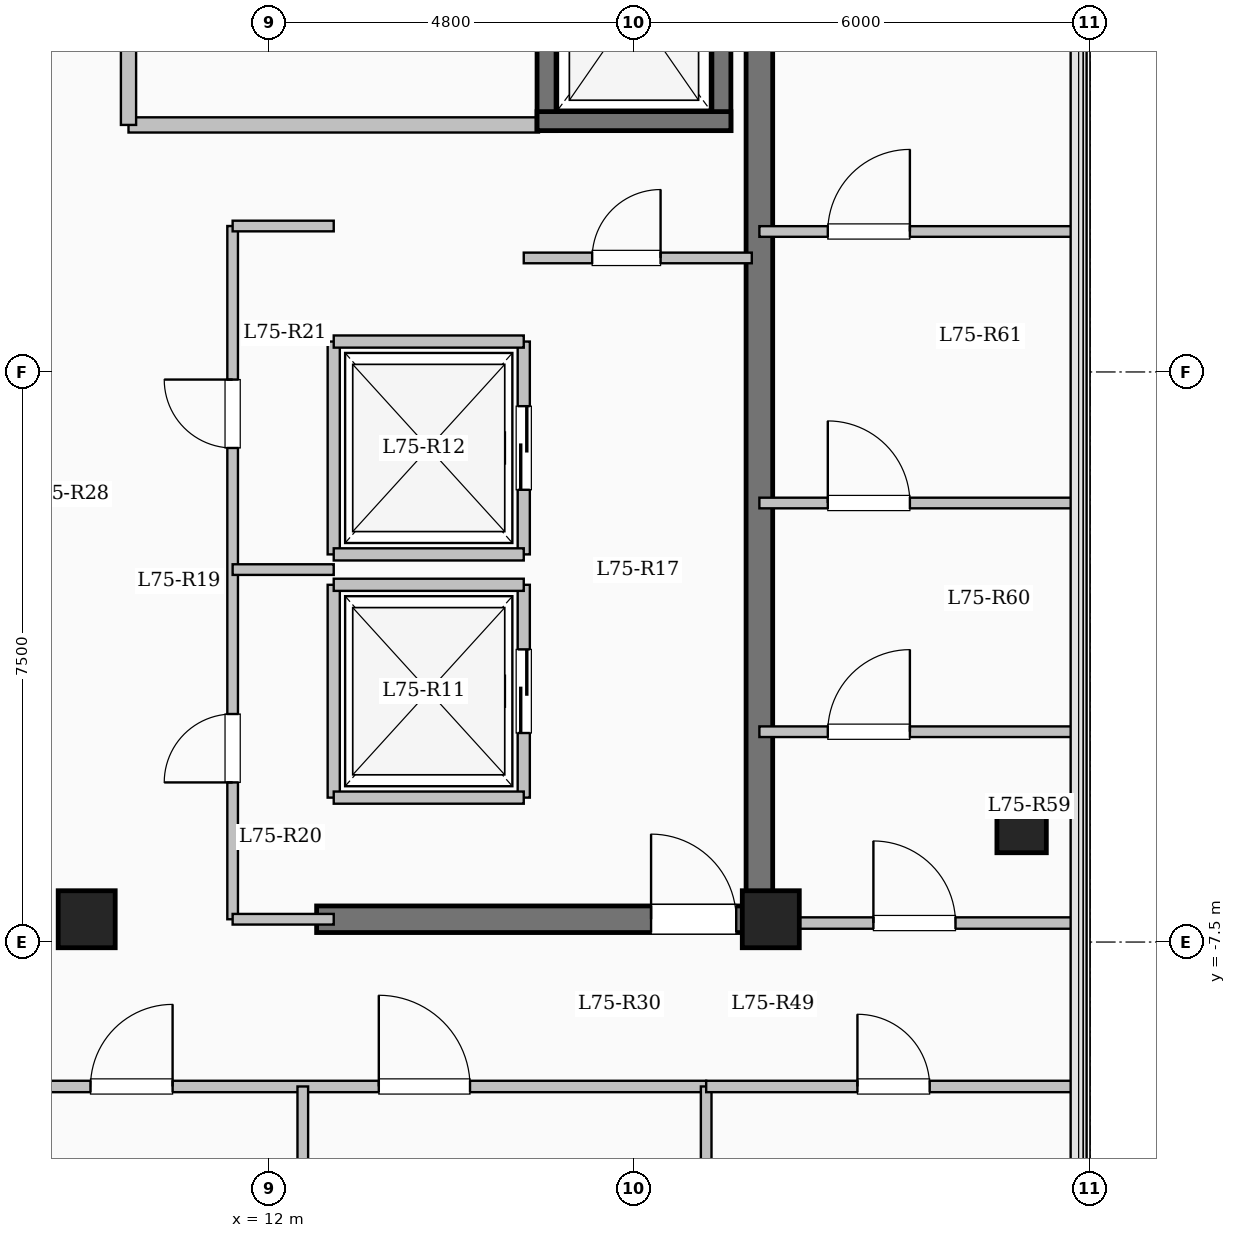
"""IFC4 building model, lengths in metres.
Left out: names, types, materials, properties, quantities, classifications, styles, units other than length and angle.
Written with IfcOpenShell. Run it as: python <this file> out.ifc"""

import sys

from ifc_helpers import new_model, si_unit, direction, frame, frame_2d, origin, origin_2d, place, context, subcontext, project, spatial, rectangle, extrude, element, fill, save


model = new_model("IFC4")
c1 = context("Model", 3, precision=1e-05, world=origin(), true_north=direction((0.0, 1.0)))
c2 = subcontext(c1, "Body", "Model", "MODEL_VIEW")
j1 = project(units=[si_unit("LENGTHUNIT", "METRE"), si_unit("PLANEANGLEUNIT", "RADIAN")], contexts=[c1])
p1 = place(None, origin())
s1 = spatial("IfcSite", under=j1, at=p1, CompositionType="ELEMENT")
p2 = place(p1, origin())
s2 = spatial("IfcBuilding", under=s1, at=p2, CompositionType="ELEMENT")
p3 = place(p2, frame((0.0, 0.0, 276.3)))
s3 = spatial("IfcBuildingStorey", under=s2, at=p3, CompositionType="ELEMENT", Elevation=276.3)
for number, where, z_axis, x_axis in (
    (1, (9.6, -7.2, 0.0), (0.0, 0.0, 1.0), (1.0, 0.0, 0.0)),
    (2, (18.6, -7.2, 0.0), (0.0, 0.0, 1.0), (1.0, 0.0, 0.0)),
):
    element("IfcColumn", number, at=place(p3, frame(where, z_axis=z_axis, x_axis=x_axis)), inside=s3, PredefinedType="COLUMN", context=c2, shape_type="SweptSolid", body=[
        extrude(rectangle(XDim=0.75, YDim=0.75, at=origin_2d()), origin(), (0.0, 0.0, 1.0), 5.25),
    ])
p4 = place(p3, frame((21.9, -6.0, 0.0), z_axis=(0.0, 0.0, 1.0), x_axis=(1.0, 0.0, 0.0)))
e3 = element("IfcColumn", 3, at=p4, inside=s3, PredefinedType="COLUMN", context=c2, shape_type="SweptSolid", body=[
    extrude(rectangle(XDim=0.65, YDim=0.65, at=origin_2d()), origin(), (0.0, 0.0, 1.0), 5.25),
])
p5 = place(p3, frame((10.15, 3.25, 0.0), z_axis=(0.0, 0.0, 1.0), x_axis=(1.0, 0.0, 0.0)))
e4 = element("IfcWall", 4, at=p5, inside=s3, PredefinedType="SOLIDWALL", context=c2, shape_type="SweptSolid", body=[
    extrude(rectangle(XDim=5.4, YDim=0.2, at=frame_2d((2.7, 0.0))), origin(), (0.0, 0.0, 1.0), 4.95),
])
p6 = place(p3, frame((10.15, 3.25, 0.0), z_axis=(0.0, 0.0, 1.0), x_axis=(0.0, 1.0, 0.0)))
e5 = element("IfcWall", 5, at=p6, inside=s3, PredefinedType="SOLIDWALL", context=c2, shape_type="SweptSolid", body=[
    extrude(rectangle(XDim=3.25, YDim=0.2, at=frame_2d((1.625, 0.0))), origin(), (0.0, 0.0, 1.0), 4.95),
])
p7 = place(p6, frame((1.1, 0.0, 0.0)))
e6 = element("IfcOpeningElement", 6, at=p7, cuts=e5, PredefinedType="OPENING", context=c2, shape_type="SweptSolid", body=[
    extrude(rectangle(XDim=1.02, YDim=2.15, at=frame_2d((0.51, 1.075))), frame((0.0, 0.11, 0.0), z_axis=(0.0, -1.0, 0.0), x_axis=(1.0, 0.0, 0.0)), (0.0, 0.0, 1.0), 0.22),
])
p8 = place(p3, frame((15.65, 3.175, 0.0), z_axis=(0.0, 0.0, 1.0), x_axis=(0.0, 1.0, 0.0)))
e7 = element("IfcWall", 7, at=p8, inside=s3, PredefinedType="SHEAR", context=c2, shape_type="SweptSolid", body=[
    extrude(rectangle(XDim=3.25, YDim=0.25, at=frame_2d((1.625, 0.0))), origin(), (0.0, 0.0, 1.0), 5.25),
])
p9 = place(p8, frame((1.075, 0.0, 0.0)))
e8 = element("IfcOpeningElement", 8, at=p9, cuts=e7, PredefinedType="OPENING", context=c2, shape_type="SweptSolid", body=[
    extrude(rectangle(XDim=1.1, YDim=2.15, at=frame_2d((0.55, 1.075))), frame((0.0, 0.135, 0.0), z_axis=(0.0, -1.0, 0.0), x_axis=(1.0, 0.0, 0.0)), (0.0, 0.0, 1.0), 0.27),
])
p10 = place(p3, frame((17.95, 3.175, 0.0), z_axis=(0.0, 0.0, 1.0), x_axis=(0.0, 1.0, 0.0)))
e9 = element("IfcWall", 9, at=p10, inside=s3, PredefinedType="SHEAR", context=c2, shape_type="SweptSolid", body=[
    extrude(rectangle(XDim=3.25, YDim=0.25, at=frame_2d((1.625, 0.0))), origin(), (0.0, 0.0, 1.0), 5.25),
])
p11 = place(p3, frame((15.525, 3.3, 0.0), z_axis=(0.0, 0.0, 1.0), x_axis=(1.0, 0.0, 0.0)))
e10 = element("IfcWall", 10, at=p11, inside=s3, PredefinedType="SHEAR", context=c2, shape_type="SweptSolid", body=[
    extrude(rectangle(XDim=2.55, YDim=0.25, at=frame_2d((1.275, 0.0))), origin(), (0.0, 0.0, 1.0), 5.25),
])
p12 = place(p3, frame((12.85, -5.6, 0.0), z_axis=(0.0, 0.0, 1.0), x_axis=(0.0, 1.0, 0.0)))
e11 = element("IfcWall", 11, at=p12, inside=s3, PredefinedType="SOLIDWALL", context=c2, shape_type="SweptSolid", body=[
    extrude(rectangle(XDim=2.8, YDim=0.16, at=frame_2d((1.4, 0.0))), origin(), (0.0, 0.0, 1.0), 4.95),
])
p13 = place(p3, frame((15.35, -5.6, 0.0), z_axis=(0.0, 0.0, 1.0), x_axis=(0.0, 1.0, 0.0)))
e12 = element("IfcWall", 12, at=p13, inside=s3, PredefinedType="SOLIDWALL", context=c2, shape_type="SweptSolid", body=[
    extrude(rectangle(XDim=2.8, YDim=0.16, at=frame_2d((1.4, 0.0))), origin(), (0.0, 0.0, 1.0), 4.95),
])
p14 = place(p13, frame((0.85, 0.0, 0.0)))
e13 = element("IfcOpeningElement", 13, at=p14, cuts=e12, PredefinedType="OPENING", context=c2, shape_type="SweptSolid", body=[
    extrude(rectangle(XDim=1.1, YDim=2.15, at=frame_2d((0.55, 1.075))), frame((0.0, 0.09, 0.0), z_axis=(0.0, -1.0, 0.0), x_axis=(1.0, 0.0, 0.0)), (0.0, 0.0, 1.0), 0.18),
])
for number, where, z_axis, x_axis in (
    (14, (12.85, -5.6, 0.0), (0.0, 0.0, 1.0), (1.0, 0.0, 0.0)),
    (15, (12.85, -2.8, 0.0), (0.0, 0.0, 1.0), (1.0, 0.0, 0.0)),
):
    element("IfcWall", number, at=place(p3, frame(where, z_axis=z_axis, x_axis=x_axis)), inside=s3, PredefinedType="SOLIDWALL", context=c2, shape_type="SweptSolid", body=[
        extrude(rectangle(XDim=2.5, YDim=0.16, at=frame_2d((1.25, 0.0))), origin(), (0.0, 0.0, 1.0), 4.95),
    ])
p15 = place(p3, frame((12.85, -2.4, 0.0), z_axis=(0.0, 0.0, 1.0), x_axis=(0.0, 1.0, 0.0)))
e16 = element("IfcWall", 16, at=p15, inside=s3, PredefinedType="SOLIDWALL", context=c2, shape_type="SweptSolid", body=[
    extrude(rectangle(XDim=2.8, YDim=0.16, at=frame_2d((1.4, 0.0))), origin(), (0.0, 0.0, 1.0), 4.95),
])
p16 = place(p3, frame((15.35, -2.4, 0.0), z_axis=(0.0, 0.0, 1.0), x_axis=(0.0, 1.0, 0.0)))
e17 = element("IfcWall", 17, at=p16, inside=s3, PredefinedType="SOLIDWALL", context=c2, shape_type="SweptSolid", body=[
    extrude(rectangle(XDim=2.8, YDim=0.16, at=frame_2d((1.4, 0.0))), origin(), (0.0, 0.0, 1.0), 4.95),
])
p17 = place(p16, frame((0.85, 0.0, 0.0)))
e18 = element("IfcOpeningElement", 18, at=p17, cuts=e17, PredefinedType="OPENING", context=c2, shape_type="SweptSolid", body=[
    extrude(rectangle(XDim=1.1, YDim=2.15, at=frame_2d((0.55, 1.075))), frame((0.0, 0.09, 0.0), z_axis=(0.0, -1.0, 0.0), x_axis=(1.0, 0.0, 0.0)), (0.0, 0.0, 1.0), 0.18),
])
for number, where, z_axis, x_axis in (
    (19, (12.85, -2.4, 0.0), (0.0, 0.0, 1.0), (1.0, 0.0, 0.0)),
    (20, (12.85, 0.4, 0.0), (0.0, 0.0, 1.0), (1.0, 0.0, 0.0)),
):
    element("IfcWall", number, at=place(p3, frame(where, z_axis=z_axis, x_axis=x_axis)), inside=s3, PredefinedType="SOLIDWALL", context=c2, shape_type="SweptSolid", body=[
        extrude(rectangle(XDim=2.5, YDim=0.16, at=frame_2d((1.25, 0.0))), origin(), (0.0, 0.0, 1.0), 4.95),
    ])
p18 = place(p3, frame((18.45, -7.375, 0.0), z_axis=(0.0, 0.0, 1.0), x_axis=(0.0, 1.0, 0.0)))
e21 = element("IfcWall", 21, at=p18, inside=s3, PredefinedType="SHEAR", context=c2, shape_type="SweptSolid", body=[
    extrude(rectangle(XDim=14.05, YDim=0.35, at=frame_2d((7.025, 0.0))), origin(), (0.0, 0.0, 1.0), 5.25),
])
p19 = place(p3, frame((12.625, -7.2, 0.0), z_axis=(0.0, 0.0, 1.0), x_axis=(1.0, 0.0, 0.0)))
e22 = element("IfcWall", 22, at=p19, inside=s3, PredefinedType="SHEAR", context=c2, shape_type="SweptSolid", body=[
    extrude(rectangle(XDim=6.0, YDim=0.35, at=frame_2d((3.0, 0.0))), origin(), (0.0, 0.0, 1.0), 5.25),
])
p20 = place(p19, frame((4.4, 0.0, 0.0)))
e23 = element("IfcOpeningElement", 23, at=p20, cuts=e22, PredefinedType="OPENING", context=c2, shape_type="SweptSolid", body=[
    extrude(rectangle(XDim=1.12, YDim=2.15, at=frame_2d((0.56, 1.075))), frame((0.0, 0.185, 0.0), z_axis=(0.0, -1.0, 0.0), x_axis=(1.0, 0.0, 0.0)), (0.0, 0.0, 1.0), 0.37),
])
p21 = place(p3, frame((15.35, 1.5, 0.0), z_axis=(0.0, 0.0, 1.0), x_axis=(1.0, 0.0, 0.0)))
e24 = element("IfcWall", 24, at=p21, inside=s3, PredefinedType="PARTITIONING", context=c2, shape_type="SweptSolid", body=[
    extrude(rectangle(XDim=3.0, YDim=0.14, at=frame_2d((1.5, 0.0))), origin(), (0.0, 0.0, 1.0), 4.95),
])
p22 = place(p21, frame((0.9, 0.0, 0.0)))
e25 = element("IfcOpeningElement", 25, at=p22, cuts=e24, PredefinedType="OPENING", context=c2, shape_type="SweptSolid", body=[
    extrude(rectangle(XDim=0.9, YDim=2.08, at=frame_2d((0.45, 1.04))), frame((0.0, 0.08, 0.0), z_axis=(0.0, -1.0, 0.0), x_axis=(1.0, 0.0, 0.0)), (0.0, 0.0, 1.0), 0.16),
])
p23 = place(p3, frame((11.52, -7.2, 0.0), z_axis=(0.0, 0.0, 1.0), x_axis=(0.0, 1.0, 0.0)))
e26 = element("IfcWall", 26, at=p23, inside=s3, PredefinedType="PARTITIONING", context=c2, shape_type="SweptSolid", body=[
    extrude(rectangle(XDim=9.12, YDim=0.14, at=frame_2d((4.56, 0.0))), origin(), (0.0, 0.0, 1.0), 4.95),
])
p24 = place(p23, frame((1.8, 0.0, 0.0)))
e27 = element("IfcOpeningElement", 27, at=p24, cuts=e26, PredefinedType="OPENING", context=c2, shape_type="SweptSolid", body=[
    extrude(rectangle(XDim=0.9, YDim=2.08, at=frame_2d((0.45, 1.04))), frame((0.0, 0.08, 0.0), z_axis=(0.0, -1.0, 0.0), x_axis=(1.0, 0.0, 0.0)), (0.0, 0.0, 1.0), 0.16),
])
p25 = place(p23, frame((6.2, 0.0, 0.0)))
e28 = element("IfcOpeningElement", 28, at=p25, cuts=e26, PredefinedType="OPENING", context=c2, shape_type="SweptSolid", body=[
    extrude(rectangle(XDim=0.9, YDim=2.08, at=frame_2d((0.45, 1.04))), frame((0.0, 0.08, 0.0), z_axis=(0.0, -1.0, 0.0), x_axis=(1.0, 0.0, 0.0)), (0.0, 0.0, 1.0), 0.16),
])
p26 = place(p3, frame((11.52, 1.92, 0.0), z_axis=(0.0, 0.0, 1.0), x_axis=(1.0, 0.0, 0.0)))
e29 = element("IfcWall", 29, at=p26, inside=s3, PredefinedType="PARTITIONING", context=c2, shape_type="SweptSolid", body=[
    extrude(rectangle(XDim=1.33, YDim=0.14, at=frame_2d((0.665, 0.0))), origin(), (0.0, 0.0, 1.0), 4.95),
])
p27 = place(p3, frame((11.52, -7.2, 0.0), z_axis=(0.0, 0.0, 1.0), x_axis=(1.0, 0.0, 0.0)))
e30 = element("IfcWall", 30, at=p27, inside=s3, PredefinedType="PARTITIONING", context=c2, shape_type="SweptSolid", body=[
    extrude(rectangle(XDim=1.33, YDim=0.14, at=frame_2d((0.665, 0.0))), origin(), (0.0, 0.0, 1.0), 4.085),
])
p28 = place(p3, frame((11.52, -2.6, 0.0), z_axis=(0.0, 0.0, 1.0), x_axis=(1.0, 0.0, 0.0)))
e31 = element("IfcWall", 31, at=p28, inside=s3, PredefinedType="PARTITIONING", context=c2, shape_type="SweptSolid", body=[
    extrude(rectangle(XDim=1.33, YDim=0.14, at=frame_2d((0.665, 0.0))), origin(), (0.0, 0.0, 1.0), 4.95),
])
p29 = place(p3, frame((8.55, -9.4, 0.0), z_axis=(0.0, 0.0, 1.0), x_axis=(1.0, 0.0, 0.0)))
e32 = element("IfcWall", 32, at=p29, inside=s3, PredefinedType="PARTITIONING", context=c2, shape_type="SweptSolid", body=[
    extrude(rectangle(XDim=9.2, YDim=0.15, at=frame_2d((4.6, 0.0))), origin(), (0.0, 0.0, 1.0), 4.95),
])
p30 = place(p29, frame((1.1, 0.0, 0.0)))
e33 = element("IfcOpeningElement", 33, at=p30, cuts=e32, PredefinedType="OPENING", context=c2, shape_type="SweptSolid", body=[
    extrude(rectangle(XDim=1.08, YDim=2.15, at=frame_2d((0.54, 1.075))), frame((0.0, 0.085, 0.0), z_axis=(0.0, -1.0, 0.0), x_axis=(1.0, 0.0, 0.0)), (0.0, 0.0, 1.0), 0.17),
])
p31 = place(p29, frame((4.893, 0.0, 0.0)))
e34 = element("IfcOpeningElement", 34, at=p31, cuts=e32, PredefinedType="OPENING", context=c2, shape_type="SweptSolid", body=[
    extrude(rectangle(XDim=1.2, YDim=2.15, at=frame_2d((0.6, 1.075))), frame((0.0, 0.085, 0.0), z_axis=(0.0, -1.0, 0.0), x_axis=(1.0, 0.0, 0.0)), (0.0, 0.0, 1.0), 0.17),
])
p32 = place(p3, frame((12.443, -20.9, 0.0), z_axis=(0.0, 0.0, 1.0), x_axis=(0.0, 1.0, 0.0)))
e35 = element("IfcWall", 35, at=p32, inside=s3, PredefinedType="PARTITIONING", context=c2, shape_type="SweptSolid", body=[
    extrude(rectangle(XDim=11.5, YDim=0.14, at=frame_2d((5.75, 0.0))), origin(), (0.0, 0.0, 1.0), 4.95),
])
p33 = place(p3, frame((18.45, -7.25, 0.0), z_axis=(0.0, 0.0, 1.0), x_axis=(1.0, 0.0, 0.0)))
e36 = element("IfcWall", 36, at=p33, inside=s3, PredefinedType="PARTITIONING", context=c2, shape_type="SweptSolid", body=[
    extrude(rectangle(XDim=4.23, YDim=0.15, at=frame_2d((2.115, 0.0))), origin(), (0.0, 0.0, 1.0), 4.95),
])
p34 = place(p33, frame((1.5, 0.0, 0.0)))
e37 = element("IfcOpeningElement", 37, at=p34, cuts=e36, PredefinedType="OPENING", context=c2, shape_type="SweptSolid", body=[
    extrude(rectangle(XDim=1.08, YDim=2.15, at=frame_2d((0.54, 1.075))), frame((0.0, 0.085, 0.0), z_axis=(0.0, -1.0, 0.0), x_axis=(1.0, 0.0, 0.0)), (0.0, 0.0, 1.0), 0.17),
])
p35 = place(p3, frame((17.75, -17.55, 0.0), z_axis=(0.0, 0.0, 1.0), x_axis=(0.0, 1.0, 0.0)))
e38 = element("IfcWall", 38, at=p35, inside=s3, PredefinedType="PARTITIONING", context=c2, shape_type="SweptSolid", body=[
    extrude(rectangle(XDim=8.15, YDim=0.14, at=frame_2d((4.075, 0.0))), origin(), (0.0, 0.0, 1.0), 4.95),
])
p36 = place(p3, frame((17.75, -9.4, 0.0), z_axis=(0.0, 0.0, 1.0), x_axis=(1.0, 0.0, 0.0)))
e39 = element("IfcWall", 39, at=p36, inside=s3, PredefinedType="PARTITIONING", context=c2, shape_type="SweptSolid", body=[
    extrude(rectangle(XDim=4.93, YDim=0.15, at=frame_2d((2.465, 0.0))), origin(), (0.0, 0.0, 1.0), 4.95),
])
p37 = place(p36, frame((1.99, 0.0, 0.0)))
e40 = element("IfcOpeningElement", 40, at=p37, cuts=e39, PredefinedType="OPENING", context=c2, shape_type="SweptSolid", body=[
    extrude(rectangle(XDim=0.95, YDim=2.15, at=frame_2d((0.475, 1.075))), frame((0.0, 0.085, 0.0), z_axis=(0.0, -1.0, 0.0), x_axis=(1.0, 0.0, 0.0)), (0.0, 0.0, 1.0), 0.17),
])
p38 = place(p3, frame((18.45, -4.733, 0.0), z_axis=(0.0, 0.0, 1.0), x_axis=(1.0, 0.0, 0.0)))
e41 = element("IfcWall", 41, at=p38, inside=s3, PredefinedType="PARTITIONING", context=c2, shape_type="SweptSolid", body=[
    extrude(rectangle(XDim=4.23, YDim=0.14, at=frame_2d((2.115, 0.0))), origin(), (0.0, 0.0, 1.0), 4.95),
])
p39 = place(p38, frame((0.9, 0.0, 0.0)))
e42 = element("IfcOpeningElement", 42, at=p39, cuts=e41, PredefinedType="OPENING", context=c2, shape_type="SweptSolid", body=[
    extrude(rectangle(XDim=1.08, YDim=2.15, at=frame_2d((0.54, 1.075))), frame((0.0, 0.08, 0.0), z_axis=(0.0, -1.0, 0.0), x_axis=(1.0, 0.0, 0.0)), (0.0, 0.0, 1.0), 0.16),
])
p40 = place(p3, frame((18.45, -1.724, 0.0), z_axis=(0.0, 0.0, 1.0), x_axis=(1.0, 0.0, 0.0)))
e43 = element("IfcWall", 43, at=p40, inside=s3, PredefinedType="PARTITIONING", context=c2, shape_type="SweptSolid", body=[
    extrude(rectangle(XDim=4.23, YDim=0.14, at=frame_2d((2.115, 0.0))), origin(), (0.0, 0.0, 1.0), 4.95),
])
p41 = place(p40, frame((0.9, 0.0, 0.0)))
e44 = element("IfcOpeningElement", 44, at=p41, cuts=e43, PredefinedType="OPENING", context=c2, shape_type="SweptSolid", body=[
    extrude(rectangle(XDim=1.08, YDim=2.15, at=frame_2d((0.54, 1.075))), frame((0.0, 0.08, 0.0), z_axis=(0.0, -1.0, 0.0), x_axis=(1.0, 0.0, 0.0)), (0.0, 0.0, 1.0), 0.16),
])
p42 = place(p3, frame((18.45, 1.848, 0.0), z_axis=(0.0, 0.0, 1.0), x_axis=(1.0, 0.0, 0.0)))
e45 = element("IfcWall", 45, at=p42, inside=s3, PredefinedType="PARTITIONING", context=c2, shape_type="SweptSolid", body=[
    extrude(rectangle(XDim=4.23, YDim=0.14, at=frame_2d((2.115, 0.0))), origin(), (0.0, 0.0, 1.0), 4.95),
])
p43 = place(p42, frame((0.9, 0.0, 0.0)))
e46 = element("IfcOpeningElement", 46, at=p43, cuts=e45, PredefinedType="OPENING", context=c2, shape_type="SweptSolid", body=[
    extrude(rectangle(XDim=1.08, YDim=2.15, at=frame_2d((0.54, 1.075))), frame((0.0, 0.08, 0.0), z_axis=(0.0, -1.0, 0.0), x_axis=(1.0, 0.0, 0.0)), (0.0, 0.0, 1.0), 0.16),
])
p44 = place(p14, origin())
e47 = element("IfcDoor", 47, at=p44, inside=s3, OperationType="SLIDING_TO_LEFT", PredefinedType="DOOR", context=c2, shape_type="SweptSolid", body=[
    extrude(rectangle(XDim=1.1, YDim=2.15, at=frame_2d((0.55, 1.075))), frame((0.0, 0.025, 0.0), z_axis=(0.0, -1.0, 0.0), x_axis=(1.0, 0.0, 0.0)), (0.0, 0.0, 1.0), 0.05),
])
fill(e13, e47)
p45 = place(p17, origin())
e48 = element("IfcDoor", 48, at=p45, inside=s3, OperationType="SLIDING_TO_LEFT", PredefinedType="DOOR", context=c2, shape_type="SweptSolid", body=[
    extrude(rectangle(XDim=1.1, YDim=2.15, at=frame_2d((0.55, 1.075))), frame((0.0, 0.025, 0.0), z_axis=(0.0, -1.0, 0.0), x_axis=(1.0, 0.0, 0.0)), (0.0, 0.0, 1.0), 0.05),
])
fill(e18, e48)
p46 = place(p20, origin())
e49 = element("IfcDoor", 49, at=p46, inside=s3, OperationType="SINGLE_SWING_LEFT", PredefinedType="DOOR", context=c2, shape_type="SweptSolid", body=[
    extrude(rectangle(XDim=1.12, YDim=2.15, at=frame_2d((0.56, 1.075))), frame((0.0, 0.025, 0.0), z_axis=(0.0, -1.0, 0.0), x_axis=(1.0, 0.0, 0.0)), (0.0, 0.0, 1.0), 0.05),
])
fill(e23, e49)
p47 = place(p22, origin())
e50 = element("IfcDoor", 50, at=p47, inside=s3, OperationType="SINGLE_SWING_RIGHT", PredefinedType="DOOR", context=c2, shape_type="SweptSolid", body=[
    extrude(rectangle(XDim=0.9, YDim=2.08, at=frame_2d((0.45, 1.04))), frame((0.0, 0.025, 0.0), z_axis=(0.0, -1.0, 0.0), x_axis=(1.0, 0.0, 0.0)), (0.0, 0.0, 1.0), 0.05),
])
fill(e25, e50)
p48 = place(p24, origin())
e51 = element("IfcDoor", 51, at=p48, inside=s3, OperationType="SINGLE_SWING_LEFT", PredefinedType="DOOR", context=c2, shape_type="SweptSolid", body=[
    extrude(rectangle(XDim=0.9, YDim=2.08, at=frame_2d((0.45, 1.04))), frame((0.0, 0.025, 0.0), z_axis=(0.0, -1.0, 0.0), x_axis=(1.0, 0.0, 0.0)), (0.0, 0.0, 1.0), 0.05),
])
fill(e27, e51)
p49 = place(p25, origin())
e52 = element("IfcDoor", 52, at=p49, inside=s3, OperationType="SINGLE_SWING_RIGHT", PredefinedType="DOOR", context=c2, shape_type="SweptSolid", body=[
    extrude(rectangle(XDim=0.9, YDim=2.08, at=frame_2d((0.45, 1.04))), frame((0.0, 0.025, 0.0), z_axis=(0.0, -1.0, 0.0), x_axis=(1.0, 0.0, 0.0)), (0.0, 0.0, 1.0), 0.05),
])
fill(e28, e52)
p50 = place(p30, origin())
e53 = element("IfcDoor", 53, at=p50, inside=s3, OperationType="SINGLE_SWING_RIGHT", PredefinedType="DOOR", context=c2, shape_type="SweptSolid", body=[
    extrude(rectangle(XDim=1.08, YDim=2.15, at=frame_2d((0.54, 1.075))), frame((0.0, 0.025, 0.0), z_axis=(0.0, -1.0, 0.0), x_axis=(1.0, 0.0, 0.0)), (0.0, 0.0, 1.0), 0.05),
])
fill(e33, e53)
p51 = place(p31, origin())
e54 = element("IfcDoor", 54, at=p51, inside=s3, OperationType="SINGLE_SWING_LEFT", PredefinedType="DOOR", context=c2, shape_type="SweptSolid", body=[
    extrude(rectangle(XDim=1.2, YDim=2.15, at=frame_2d((0.6, 1.075))), frame((0.0, 0.025, 0.0), z_axis=(0.0, -1.0, 0.0), x_axis=(1.0, 0.0, 0.0)), (0.0, 0.0, 1.0), 0.05),
])
fill(e34, e54)
p52 = place(p37, origin())
e55 = element("IfcDoor", 55, at=p52, inside=s3, OperationType="SINGLE_SWING_LEFT", PredefinedType="DOOR", context=c2, shape_type="SweptSolid", body=[
    extrude(rectangle(XDim=0.95, YDim=2.15, at=frame_2d((0.475, 1.075))), frame((0.0, 0.025, 0.0), z_axis=(0.0, -1.0, 0.0), x_axis=(1.0, 0.0, 0.0)), (0.0, 0.0, 1.0), 0.05),
])
fill(e40, e55)
p53 = place(p34, origin())
e56 = element("IfcDoor", 56, at=p53, inside=s3, OperationType="SINGLE_SWING_LEFT", PredefinedType="DOOR", context=c2, shape_type="SweptSolid", body=[
    extrude(rectangle(XDim=1.08, YDim=2.15, at=frame_2d((0.54, 1.075))), frame((0.0, 0.025, 0.0), z_axis=(0.0, -1.0, 0.0), x_axis=(1.0, 0.0, 0.0)), (0.0, 0.0, 1.0), 0.05),
])
fill(e37, e56)
p54 = place(p39, origin())
e57 = element("IfcDoor", 57, at=p54, inside=s3, OperationType="SINGLE_SWING_RIGHT", PredefinedType="DOOR", context=c2, shape_type="SweptSolid", body=[
    extrude(rectangle(XDim=1.08, YDim=2.15, at=frame_2d((0.54, 1.075))), frame((0.0, 0.025, 0.0), z_axis=(0.0, -1.0, 0.0), x_axis=(1.0, 0.0, 0.0)), (0.0, 0.0, 1.0), 0.05),
])
fill(e42, e57)
p55 = place(p41, origin())
e58 = element("IfcDoor", 58, at=p55, inside=s3, OperationType="SINGLE_SWING_LEFT", PredefinedType="DOOR", context=c2, shape_type="SweptSolid", body=[
    extrude(rectangle(XDim=1.08, YDim=2.15, at=frame_2d((0.54, 1.075))), frame((0.0, 0.025, 0.0), z_axis=(0.0, -1.0, 0.0), x_axis=(1.0, 0.0, 0.0)), (0.0, 0.0, 1.0), 0.05),
])
fill(e44, e58)
p56 = place(p43, origin())
e59 = element("IfcDoor", 59, at=p56, inside=s3, OperationType="SINGLE_SWING_RIGHT", PredefinedType="DOOR", context=c2, shape_type="SweptSolid", body=[
    extrude(rectangle(XDim=1.08, YDim=2.15, at=frame_2d((0.54, 1.075))), frame((0.0, 0.025, 0.0), z_axis=(0.0, -1.0, 0.0), x_axis=(1.0, 0.0, 0.0)), (0.0, 0.0, 1.0), 0.05),
])
fill(e46, e59)
save(model, sys.argv[1])
